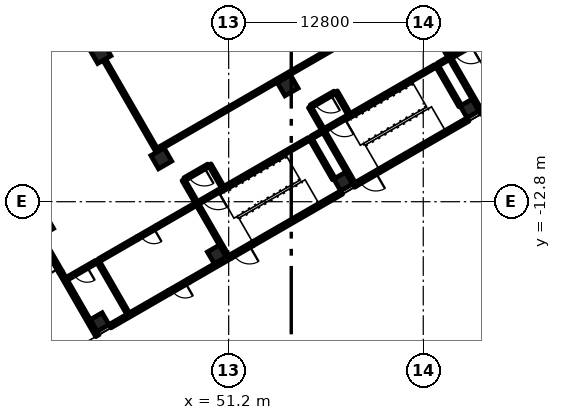
"""IFC4 building model, lengths in metres.
Left out: names, types, materials, properties, quantities, classifications, styles, units other than length and angle.
Written with IfcOpenShell. Run it as: python <this file> out.ifc"""

import sys

from ifc_helpers import new_model, si_unit, direction, frame, frame_2d, origin, origin_2d, place, context, subcontext, project, spatial, rectangle, extrude, element, fill, save


model = new_model("IFC4")
c1 = context("Model", 3, precision=1e-05, world=origin(), true_north=direction((0.0, 1.0)))
c2 = subcontext(c1, "Body", "Model", "MODEL_VIEW")
j1 = project(units=[si_unit("LENGTHUNIT", "METRE"), si_unit("PLANEANGLEUNIT", "RADIAN")], contexts=[c1])
p1 = place(None, origin())
s1 = spatial("IfcSite", under=j1, at=p1, CompositionType="ELEMENT")
p2 = place(p1, origin())
s2 = spatial("IfcBuilding", under=s1, at=p2, CompositionType="ELEMENT")
p3 = place(p2, origin())
s3 = spatial("IfcBuildingStorey", under=s2, at=p3, CompositionType="ELEMENT", Elevation=0.0)
for number, where, z_axis, x_axis in (
    (1, (42.71, -20.721, -0.3), (0.0, 0.0, 1.0), (-0.5, 0.866, 0.0)),
    (2, (50.418, -16.271, -0.3), (0.0, 0.0, 1.0), (-0.5, 0.866, 0.0)),
    (3, (58.732, -11.471, -0.3), (0.0, 0.0, 1.0), (-0.5, 0.866, 0.0)),
    (4, (67.046, -6.671, -0.3), (0.0, 0.0, 1.0), (-0.5, 0.866, 0.0)),
    (5, (39.061, -14.399, -0.3), (0.0, 0.0, 1.0), (-0.5, 0.866, 0.0)),
):
    element("IfcColumn", number, at=place(p3, frame(where, z_axis=z_axis, x_axis=x_axis)), inside=s3, PredefinedType="COLUMN", context=c2, shape_type="SweptSolid", body=[
        extrude(rectangle(XDim=0.9, YDim=0.9, at=origin_2d()), origin(), (0.0, 0.0, 1.0), 6.3),
    ])
for number, where, z_axis, x_axis in (
    (6, (46.768, -9.949, -0.3), (0.0, 0.0, 1.0), (-0.5, 0.866, 0.0)),
    (7, (55.082, -5.149, -0.3), (0.0, 0.0, 1.0), (-0.5, 0.866, 0.0)),
    (8, (42.768, -3.021, -0.3), (0.0, 0.0, 1.0), (-0.5, 0.866, 0.0)),
):
    element("IfcColumn", number, at=place(p3, frame(where, z_axis=z_axis, x_axis=x_axis)), inside=s3, PredefinedType="COLUMN", context=c2, shape_type="SweptSolid", body=[
        extrude(rectangle(XDim=1.0, YDim=1.0, at=origin_2d()), origin(), (0.0, 0.0, 1.0), 6.3),
    ])
p4 = place(p3, frame((42.562, -21.615, 0.0), z_axis=(0.0, 0.0, 1.0), x_axis=(-0.499972286653, 0.866041403502, 0.0)))
e9 = element("IfcWall", 9, at=p4, inside=s3, PredefinedType="SOLIDWALL", context=c2, shape_type="SweptSolid", body=[
    extrude(rectangle(XDim=4.85, YDim=0.25, at=frame_2d((2.425, 0.0))), origin(), (0.0, 0.0, 1.0), 5.7),
])
p5 = place(p3, frame((40.138, -17.414, 0.0), z_axis=(0.0, 0.0, 1.0), x_axis=(-0.500031774688, 0.866007057882, 0.0)))
e10 = element("IfcWall", 10, at=p5, inside=s3, PredefinedType="SOLIDWALL", context=c2, shape_type="SweptSolid", body=[
    extrude(rectangle(XDim=2.3, YDim=0.25, at=frame_2d((1.15, 0.0))), origin(), (0.0, 0.0, 1.0), 5.7),
])
p6 = place(p5, frame((0.25, 0.0, 0.0)))
e11 = element("IfcOpeningElement", 11, at=p6, cuts=e10, PredefinedType="OPENING", context=c2, shape_type="SweptSolid", body=[
    extrude(rectangle(XDim=1.8, YDim=2.1, at=frame_2d((0.9, 1.05))), frame((0.0, 0.135, 0.0), z_axis=(0.0, -1.0, 0.0), x_axis=(1.0, 0.0, 0.0)), (0.0, 0.0, 1.0), 0.27),
])
p7 = place(p3, frame((47.263, -18.756, 0.0), z_axis=(0.0, 0.0, 1.0), x_axis=(-0.866022053326, -0.50000580312, 0.0)))
e12 = element("IfcWall", 12, at=p7, inside=s3, PredefinedType="SOLIDWALL", context=c2, shape_type="SweptSolid", body=[
    extrude(rectangle(XDim=4.475, YDim=0.25, at=frame_2d((2.238, 0.0))), origin(), (0.0, 0.0, 1.0), 5.7),
])
p8 = place(p3, frame((48.562, -18.006, 0.0), z_axis=(0.0, 0.0, 1.0), x_axis=(-0.866031096941, -0.499990139034, 0.0)))
e13 = element("IfcWall", 13, at=p8, inside=s3, PredefinedType="SOLIDWALL", context=c2, shape_type="SweptSolid", body=[
    extrude(rectangle(XDim=1.5, YDim=0.25, at=frame_2d((0.75, 0.0))), origin(), (0.0, 0.0, 1.0), 5.7),
])
p9 = place(p8, frame((0.25, 0.0, 0.0)))
e14 = element("IfcOpeningElement", 14, at=p9, cuts=e13, PredefinedType="OPENING", context=c2, shape_type="SweptSolid", body=[
    extrude(rectangle(XDim=1.0, YDim=2.1, at=frame_2d((0.5, 1.05))), frame((0.0, 0.135, 0.0), z_axis=(0.0, -1.0, 0.0), x_axis=(1.0, 0.0, 0.0)), (0.0, 0.0, 1.0), 0.27),
])
p10 = place(p3, frame((51.312, -16.419, 0.0), z_axis=(0.0, 0.0, 1.0), x_axis=(-0.866048579423, -0.499959856469, 0.0)))
e15 = element("IfcWall", 15, at=p10, inside=s3, PredefinedType="SOLIDWALL", context=c2, shape_type="SweptSolid", body=[
    extrude(rectangle(XDim=3.175, YDim=0.25, at=frame_2d((1.587, 0.0))), origin(), (0.0, 0.0, 1.0), 5.7),
])
p11 = place(p3, frame((52.784, -15.569, 0.0), z_axis=(0.0, 0.0, 1.0), x_axis=(-0.865989465428, -0.500062241894, 0.0)))
e16 = element("IfcWall", 16, at=p11, inside=s3, PredefinedType="SOLIDWALL", context=c2, shape_type="SweptSolid", body=[
    extrude(rectangle(XDim=1.7, YDim=0.25, at=frame_2d((0.85, 0.0))), origin(), (0.0, 0.0, 1.0), 5.7),
])
p12 = place(p11, frame((0.25, 0.0, 0.0)))
e17 = element("IfcOpeningElement", 17, at=p12, cuts=e16, PredefinedType="OPENING", context=c2, shape_type="SweptSolid", body=[
    extrude(rectangle(XDim=1.2, YDim=2.1, at=frame_2d((0.6, 1.05))), frame((0.0, 0.135, 0.0), z_axis=(0.0, -1.0, 0.0), x_axis=(1.0, 0.0, 0.0)), (0.0, 0.0, 1.0), 0.27),
])
p13 = place(p3, frame((58.63, -12.194, 0.0), z_axis=(0.0, 0.0, 1.0), x_axis=(-0.866026575979, -0.499997969693, 0.0)))
e18 = element("IfcWall", 18, at=p13, inside=s3, PredefinedType="SOLIDWALL", context=c2, shape_type="SweptSolid", body=[
    extrude(rectangle(XDim=6.75, YDim=0.25, at=frame_2d((3.375, 0.0))), origin(), (0.0, 0.0, 1.0), 5.7),
])
p14 = place(p3, frame((61.098, -10.769, 0.0), z_axis=(0.0, 0.0, 1.0), x_axis=(-0.866058118026, -0.49994333299, 0.0)))
e19 = element("IfcWall", 19, at=p14, inside=s3, PredefinedType="SOLIDWALL", context=c2, shape_type="SweptSolid", body=[
    extrude(rectangle(XDim=1.85, YDim=0.25, at=frame_2d((0.925, 0.0))), origin(), (0.0, 0.0, 1.0), 5.7),
])
p15 = place(p14, frame((0.25, 0.0, 0.0)))
e20 = element("IfcOpeningElement", 20, at=p15, cuts=e19, PredefinedType="OPENING", context=c2, shape_type="SweptSolid", body=[
    extrude(rectangle(XDim=1.2, YDim=2.1, at=frame_2d((0.6, 1.05))), frame((0.0, 0.135, 0.0), z_axis=(0.0, -1.0, 0.0), x_axis=(1.0, 0.0, 0.0)), (0.0, 0.0, 1.0), 0.27),
])
p16 = place(p3, frame((66.944, -7.394, 0.0), z_axis=(0.0, 0.0, 1.0), x_axis=(-0.866026575979, -0.499997969693, 0.0)))
e21 = element("IfcWall", 21, at=p16, inside=s3, PredefinedType="SOLIDWALL", context=c2, shape_type="SweptSolid", body=[
    extrude(rectangle(XDim=6.75, YDim=0.25, at=frame_2d((3.375, 0.0))), origin(), (0.0, 0.0, 1.0), 5.7),
])
p17 = place(p3, frame((69.412, -5.969, 0.0), z_axis=(0.0, 0.0, 1.0), x_axis=(-0.866033964044, -0.499985172903, 0.0)))
e22 = element("IfcWall", 22, at=p17, inside=s3, PredefinedType="SOLIDWALL", context=c2, shape_type="SweptSolid", body=[
    extrude(rectangle(XDim=1.85, YDim=0.25, at=frame_2d((0.925, 0.0))), origin(), (0.0, 0.0, 1.0), 5.7),
])
p18 = place(p17, frame((0.25, 0.0, 0.0)))
e23 = element("IfcOpeningElement", 23, at=p18, cuts=e22, PredefinedType="OPENING", context=c2, shape_type="SweptSolid", body=[
    extrude(rectangle(XDim=1.2, YDim=2.1, at=frame_2d((0.6, 1.05))), frame((0.0, 0.135, 0.0), z_axis=(0.0, -1.0, 0.0), x_axis=(1.0, 0.0, 0.0)), (0.0, 0.0, 1.0), 0.27),
])
p19 = place(p3, frame((59.496, -11.694, 0.0), z_axis=(0.0, 0.0, 1.0), x_axis=(-0.865982457891, -0.500074377092, 0.0)))
e24 = element("IfcWall", 24, at=p19, inside=s3, PredefinedType="SOLIDWALL", context=c2, shape_type="SweptSolid", body=[
    extrude(rectangle(XDim=0.1, YDim=0.25, at=frame_2d((0.05, 0.0))), origin(), (0.0, 0.0, 1.0), 5.7),
])
p20 = place(p3, frame((67.81, -6.894, 0.0), z_axis=(0.0, 0.0, 1.0), x_axis=(-0.867038199201, -0.4982416694, 0.0)))
e25 = element("IfcWall", 25, at=p20, inside=s3, PredefinedType="SOLIDWALL", context=c2, shape_type="SweptSolid", body=[
    extrude(rectangle(XDim=0.1, YDim=0.25, at=frame_2d((0.05, 0.0))), origin(), (0.0, 0.0, 1.0), 5.7),
])
p21 = place(p3, frame((51.119, -16.385, 0.0), z_axis=(0.0, 0.0, 1.0), x_axis=(-0.49999894854, 0.866026010844, 0.0)))
e26 = element("IfcWall", 26, at=p21, inside=s3, PredefinedType="SOLIDWALL", context=c2, shape_type="SweptSolid", body=[
    extrude(rectangle(XDim=4.0, YDim=0.2, at=frame_2d((2.0, 0.0))), origin(), (0.0, 0.0, 1.0), 5.7),
])
p22 = place(p3, frame((58.117, -11.306, 0.0), z_axis=(0.0, 0.0, 1.0), x_axis=(-0.499933790963, 0.866063626216, 0.0)))
e27 = element("IfcWall", 27, at=p22, inside=s3, PredefinedType="SOLIDWALL", context=c2, shape_type="SweptSolid", body=[
    extrude(rectangle(XDim=3.1, YDim=0.2, at=frame_2d((1.55, 0.0))), origin(), (0.0, 0.0, 1.0), 5.7),
])
p23 = place(p3, frame((59.433, -11.585, 0.0), z_axis=(0.0, 0.0, 1.0), x_axis=(-0.49999894854, 0.866026010844, 0.0)))
e28 = element("IfcWall", 28, at=p23, inside=s3, PredefinedType="SOLIDWALL", context=c2, shape_type="SweptSolid", body=[
    extrude(rectangle(XDim=4.0, YDim=0.2, at=frame_2d((2.0, 0.0))), origin(), (0.0, 0.0, 1.0), 5.7),
])
p24 = place(p3, frame((66.431, -6.506, 0.0), z_axis=(0.0, 0.0, 1.0), x_axis=(-0.49999285859, 0.86602952684, 0.0)))
e29 = element("IfcWall", 29, at=p24, inside=s3, PredefinedType="SOLIDWALL", context=c2, shape_type="SweptSolid", body=[
    extrude(rectangle(XDim=3.1, YDim=0.2, at=frame_2d((1.55, 0.0))), origin(), (0.0, 0.0, 1.0), 5.7),
])
p25 = place(p3, frame((67.747, -6.785, 0.0), z_axis=(0.0, 0.0, 1.0), x_axis=(-0.49999894854, 0.866026010844, 0.0)))
e30 = element("IfcWall", 30, at=p25, inside=s3, PredefinedType="SOLIDWALL", context=c2, shape_type="SweptSolid", body=[
    extrude(rectangle(XDim=4.0, YDim=0.2, at=frame_2d((2.0, 0.0))), origin(), (0.0, 0.0, 1.0), 5.7),
])
p26 = place(p3, frame((50.722, -11.996, 0.0), z_axis=(0.0, 0.0, 1.0), x_axis=(-0.866036909293, -0.499980071345, 0.0)))
e31 = element("IfcWall", 31, at=p26, inside=s3, PredefinedType="SOLIDWALL", context=c2, shape_type="SweptSolid", body=[
    extrude(rectangle(XDim=1.75, YDim=0.2, at=frame_2d((0.875, 0.0))), origin(), (0.0, 0.0, 1.0), 5.7),
])
p27 = place(p26, frame((0.25, 0.0, 0.0)))
e32 = element("IfcOpeningElement", 32, at=p27, cuts=e31, PredefinedType="OPENING", context=c2, shape_type="SweptSolid", body=[
    extrude(rectangle(XDim=1.2, YDim=2.1, at=frame_2d((0.6, 1.05))), frame((0.0, 0.11, 0.0), z_axis=(0.0, -1.0, 0.0), x_axis=(1.0, 0.0, 0.0)), (0.0, 0.0, 1.0), 0.22),
])
p28 = place(p3, frame((50.722, -11.996, 0.0), z_axis=(0.0, 0.0, 1.0), x_axis=(0.866027239912, 0.49999681972, 0.0)))
e33 = element("IfcWall", 33, at=p28, inside=s3, PredefinedType="SOLIDWALL", context=c2, shape_type="SweptSolid", body=[
    extrude(rectangle(XDim=6.65, YDim=0.2, at=frame_2d((3.325, 0.0))), origin(), (0.0, 0.0, 1.0), 5.7),
])
p29 = place(p3, frame((59.035, -7.196, 0.0), z_axis=(0.0, 0.0, 1.0), x_axis=(-0.866002029911, -0.500040482552, 0.0)))
e34 = element("IfcWall", 34, at=p29, inside=s3, PredefinedType="SOLIDWALL", context=c2, shape_type="SweptSolid", body=[
    extrude(rectangle(XDim=1.75, YDim=0.2, at=frame_2d((0.875, 0.0))), origin(), (0.0, 0.0, 1.0), 5.7),
])
p30 = place(p29, frame((0.25, 0.0, 0.0)))
e35 = element("IfcOpeningElement", 35, at=p30, cuts=e34, PredefinedType="OPENING", context=c2, shape_type="SweptSolid", body=[
    extrude(rectangle(XDim=1.2, YDim=2.1, at=frame_2d((0.6, 1.05))), frame((0.0, 0.11, 0.0), z_axis=(0.0, -1.0, 0.0), x_axis=(1.0, 0.0, 0.0)), (0.0, 0.0, 1.0), 0.22),
])
p31 = place(p3, frame((59.035, -7.196, 0.0), z_axis=(0.0, 0.0, 1.0), x_axis=(0.866027239912, 0.49999681972, 0.0)))
e36 = element("IfcWall", 36, at=p31, inside=s3, PredefinedType="SOLIDWALL", context=c2, shape_type="SweptSolid", body=[
    extrude(rectangle(XDim=6.65, YDim=0.2, at=frame_2d((3.325, 0.0))), origin(), (0.0, 0.0, 1.0), 5.7),
])
p32 = place(p3, frame((67.349, -2.396, 0.0), z_axis=(0.0, 0.0, 1.0), x_axis=(-0.866036909293, -0.499980071345, 0.0)))
e37 = element("IfcWall", 37, at=p32, inside=s3, PredefinedType="SOLIDWALL", context=c2, shape_type="SweptSolid", body=[
    extrude(rectangle(XDim=1.75, YDim=0.2, at=frame_2d((0.875, 0.0))), origin(), (0.0, 0.0, 1.0), 5.7),
])
p33 = place(p32, frame((0.25, 0.0, 0.0)))
e38 = element("IfcOpeningElement", 38, at=p33, cuts=e37, PredefinedType="OPENING", context=c2, shape_type="SweptSolid", body=[
    extrude(rectangle(XDim=1.2, YDim=2.1, at=frame_2d((0.6, 1.05))), frame((0.0, 0.11, 0.0), z_axis=(0.0, -1.0, 0.0), x_axis=(1.0, 0.0, 0.0)), (0.0, 0.0, 1.0), 0.22),
])
for number, where, z_axis, x_axis in (
    (39, (49.07, -12.835, 0.0), (0.0, 0.0, 1.0), (-0.5, 0.866, 0.0)),
    (40, (50.802, -11.835, 0.0), (0.0, 0.0, 1.0), (-0.5, 0.866, 0.0)),
):
    element("IfcWall", number, at=place(p3, frame(where, z_axis=z_axis, x_axis=x_axis)), inside=s3, PredefinedType="PARTITIONING", context=c2, shape_type="SweptSolid", body=[
        extrude(rectangle(XDim=1.7, YDim=0.2, at=frame_2d((0.85, 0.0))), origin(), (0.0, 0.0, 1.0), 5.1),
    ])
for number, where, z_axis, x_axis in (
    (41, (57.383, -8.035, 0.0), (0.0, 0.0, 1.0), (-0.5, 0.866, 0.0)),
    (42, (59.115, -7.035, 0.0), (0.0, 0.0, 1.0), (-0.5, 0.866, 0.0)),
):
    element("IfcWall", number, at=place(p3, frame(where, z_axis=z_axis, x_axis=x_axis)), inside=s3, PredefinedType="PARTITIONING", context=c2, shape_type="SweptSolid", body=[
        extrude(rectangle(XDim=1.7, YDim=0.2, at=frame_2d((0.85, 0.0))), origin(), (0.0, 0.0, 1.0), 5.1),
    ])
p34 = place(p3, frame((65.697, -3.235, 0.0), z_axis=(0.0, 0.0, 1.0), x_axis=(-0.499892348375, 0.866087547558, 0.0)))
e43 = element("IfcWall", 43, at=p34, inside=s3, PredefinedType="PARTITIONING", context=c2, shape_type="SweptSolid", body=[
    extrude(rectangle(XDim=1.7, YDim=0.2, at=frame_2d((0.85, 0.0))), origin(), (0.0, 0.0, 1.0), 5.1),
])
p35 = place(p3, frame((49.865, -10.413, 0.0), z_axis=(0.0, 0.0, 1.0), x_axis=(-0.866047807691, -0.499961193289, 0.0)))
e44 = element("IfcWall", 44, at=p35, inside=s3, PredefinedType="PARTITIONING", context=c2, shape_type="SweptSolid", body=[
    extrude(rectangle(XDim=1.8, YDim=0.2, at=frame_2d((0.9, 0.0))), origin(), (0.0, 0.0, 1.0), 5.1),
])
p36 = place(p35, frame((0.3, 0.0, 0.0)))
e45 = element("IfcOpeningElement", 45, at=p36, cuts=e44, PredefinedType="OPENING", context=c2, shape_type="SweptSolid", body=[
    extrude(rectangle(XDim=1.2, YDim=2.1, at=frame_2d((0.6, 1.05))), frame((0.0, 0.11, 0.0), z_axis=(0.0, -1.0, 0.0), x_axis=(1.0, 0.0, 0.0)), (0.0, 0.0, 1.0), 0.22),
])
p37 = place(p3, frame((58.179, -5.613, 0.0), z_axis=(0.0, 0.0, 1.0), x_axis=(-0.866047807691, -0.499961193289, 0.0)))
e46 = element("IfcWall", 46, at=p37, inside=s3, PredefinedType="PARTITIONING", context=c2, shape_type="SweptSolid", body=[
    extrude(rectangle(XDim=1.8, YDim=0.2, at=frame_2d((0.9, 0.0))), origin(), (0.0, 0.0, 1.0), 5.1),
])
p38 = place(p37, frame((0.3, 0.0, 0.0)))
e47 = element("IfcOpeningElement", 47, at=p38, cuts=e46, PredefinedType="OPENING", context=c2, shape_type="SweptSolid", body=[
    extrude(rectangle(XDim=1.2, YDim=2.1, at=frame_2d((0.6, 1.05))), frame((0.0, 0.11, 0.0), z_axis=(0.0, -1.0, 0.0), x_axis=(1.0, 0.0, 0.0)), (0.0, 0.0, 1.0), 0.22),
])
p39 = place(p3, frame((44.581, -20.16, 0.0), z_axis=(0.0, 0.0, 1.0), x_axis=(-0.49999894854, 0.866026010844, 0.0)))
e48 = element("IfcWall", 48, at=p39, inside=s3, PredefinedType="PARTITIONING", context=c2, shape_type="SweptSolid", body=[
    extrude(rectangle(XDim=4.0, YDim=0.2, at=frame_2d((2.0, 0.0))), origin(), (0.0, 0.0, 1.0), 5.1),
])
p40 = place(p3, frame((42.667, -16.646, 0.0), z_axis=(0.0, 0.0, 1.0), x_axis=(0.86601045545, 0.500025890382, 0.0)))
e49 = element("IfcWall", 49, at=p40, inside=s3, PredefinedType="PARTITIONING", context=c2, shape_type="SweptSolid", body=[
    extrude(rectangle(XDim=2.925, YDim=0.2, at=frame_2d((1.462, 0.0))), origin(), (0.0, 0.0, 1.0), 5.1),
])
p41 = place(p3, frame((46.5, -14.434, 0.0), z_axis=(0.0, 0.0, 1.0), x_axis=(-0.866031096941, -0.499990139034, 0.0)))
e50 = element("IfcWall", 50, at=p41, inside=s3, PredefinedType="PARTITIONING", context=c2, shape_type="SweptSolid", body=[
    extrude(rectangle(XDim=1.5, YDim=0.2, at=frame_2d((0.75, 0.0))), origin(), (0.0, 0.0, 1.0), 5.1),
])
p42 = place(p41, frame((0.25, 0.0, 0.0)))
e51 = element("IfcOpeningElement", 51, at=p42, cuts=e50, PredefinedType="OPENING", context=c2, shape_type="SweptSolid", body=[
    extrude(rectangle(XDim=1.0, YDim=2.1, at=frame_2d((0.5, 1.05))), frame((0.0, 0.11, 0.0), z_axis=(0.0, -1.0, 0.0), x_axis=(1.0, 0.0, 0.0)), (0.0, 0.0, 1.0), 0.22),
])
p43 = place(p3, frame((46.5, -14.434, 0.0), z_axis=(0.0, 0.0, 1.0), x_axis=(0.866046596414, 0.499963291492, 0.0)))
e52 = element("IfcWall", 52, at=p43, inside=s3, PredefinedType="PARTITIONING", context=c2, shape_type="SweptSolid", body=[
    extrude(rectangle(XDim=2.925, YDim=0.2, at=frame_2d((1.462, 0.0))), origin(), (0.0, 0.0, 1.0), 5.1),
])
p44 = place(p3, frame((42.494, -16.746, 0.0), z_axis=(0.0, 0.0, 1.0), x_axis=(-0.866017533419, -0.500013631625, 0.0)))
e53 = element("IfcWall", 53, at=p44, inside=s3, PredefinedType="PARTITIONING", context=c2, shape_type="SweptSolid", body=[
    extrude(rectangle(XDim=2.25, YDim=0.2, at=frame_2d((1.125, 0.0))), origin(), (0.0, 0.0, 1.0), 5.1),
])
p45 = place(p44, frame((0.7, 0.0, 0.0)))
e54 = element("IfcOpeningElement", 54, at=p45, cuts=e53, PredefinedType="OPENING", context=c2, shape_type="SweptSolid", body=[
    extrude(rectangle(XDim=1.0, YDim=2.1, at=frame_2d((0.5, 1.05))), frame((0.0, 0.11, 0.0), z_axis=(0.0, -1.0, 0.0), x_axis=(1.0, 0.0, 0.0)), (0.0, 0.0, 1.0), 0.22),
])
p46 = place(p3, frame((46.456, -9.407, 0.0), z_axis=(0.0, 0.0, 1.0), x_axis=(-0.500004234368, 0.866022959057, 0.0)))
e55 = element("IfcWall", 55, at=p46, inside=s3, PredefinedType="PARTITIONING", context=c2, shape_type="SweptSolid", body=[
    extrude(rectangle(XDim=6.875, YDim=0.2, at=frame_2d((3.438, 0.0))), origin(), (0.0, 0.0, 1.0), 5.1),
])
p47 = place(p3, frame((46.542, -9.357, 0.0), z_axis=(0.0, 0.0, 1.0), x_axis=(0.866023601547, 0.500003121554, 0.0)))
e56 = element("IfcWall", 56, at=p47, inside=s3, PredefinedType="PARTITIONING", context=c2, shape_type="SweptSolid", body=[
    extrude(rectangle(XDim=19.0, YDim=0.2, at=frame_2d((9.5, 0.0))), origin(), (0.0, 0.0, 1.0), 5.1),
])
p48 = place(p3, frame((56.654, -8.571, 0.0), z_axis=(0.0, 0.0, 1.0), x_axis=(0.866094119867, 0.499880961361, 0.0)))
e57 = element("IfcWall", 57, at=p48, inside=s3, PredefinedType="PARTITIONING", context=c2, shape_type="SweptSolid", body=[
    extrude(rectangle(XDim=0.8, YDim=0.2, at=frame_2d((0.4, 0.0))), origin(), (0.0, 0.0, 1.0), 5.1),
])
p49 = place(p3, frame((64.968, -3.771, 0.0), z_axis=(0.0, 0.0, 1.0), x_axis=(0.865885638426, 0.500242002602, 0.0)))
e58 = element("IfcWall", 58, at=p49, inside=s3, PredefinedType="PARTITIONING", context=c2, shape_type="SweptSolid", body=[
    extrude(rectangle(XDim=0.8, YDim=0.2, at=frame_2d((0.4, 0.0))), origin(), (0.0, 0.0, 1.0), 5.1),
])
p50 = place(p6, origin())
e59 = element("IfcDoor", 59, at=p50, inside=s3, OperationType="DOUBLE_DOOR_SINGLE_SWING", PredefinedType="DOOR", context=c2, shape_type="SweptSolid", body=[
    extrude(rectangle(XDim=1.8, YDim=2.1, at=frame_2d((0.9, 1.05))), frame((0.0, 0.025, 0.0), z_axis=(0.0, -1.0, 0.0), x_axis=(1.0, 0.0, 0.0)), (0.0, 0.0, 1.0), 0.05),
])
fill(e11, e59)
p51 = place(p9, origin())
e60 = element("IfcDoor", 60, at=p51, inside=s3, OperationType="SINGLE_SWING_LEFT", PredefinedType="DOOR", context=c2, shape_type="SweptSolid", body=[
    extrude(rectangle(XDim=1.0, YDim=2.1, at=frame_2d((0.5, 1.05))), frame((0.0, 0.025, 0.0), z_axis=(0.0, -1.0, 0.0), x_axis=(1.0, 0.0, 0.0)), (0.0, 0.0, 1.0), 0.05),
])
fill(e14, e60)
p52 = place(p12, origin())
e61 = element("IfcDoor", 61, at=p52, inside=s3, OperationType="SINGLE_SWING_LEFT", PredefinedType="DOOR", context=c2, shape_type="SweptSolid", body=[
    extrude(rectangle(XDim=1.2, YDim=2.1, at=frame_2d((0.6, 1.05))), frame((0.0, 0.025, 0.0), z_axis=(0.0, -1.0, 0.0), x_axis=(1.0, 0.0, 0.0)), (0.0, 0.0, 1.0), 0.05),
])
fill(e17, e61)
p53 = place(p15, origin())
e62 = element("IfcDoor", 62, at=p53, inside=s3, OperationType="SINGLE_SWING_LEFT", PredefinedType="DOOR", context=c2, shape_type="SweptSolid", body=[
    extrude(rectangle(XDim=1.2, YDim=2.1, at=frame_2d((0.6, 1.05))), frame((0.0, 0.025, 0.0), z_axis=(0.0, -1.0, 0.0), x_axis=(1.0, 0.0, 0.0)), (0.0, 0.0, 1.0), 0.05),
])
fill(e20, e62)
p54 = place(p27, origin())
e63 = element("IfcDoor", 63, at=p54, inside=s3, OperationType="SINGLE_SWING_LEFT", PredefinedType="DOOR", context=c2, shape_type="SweptSolid", body=[
    extrude(rectangle(XDim=1.2, YDim=2.1, at=frame_2d((0.6, 1.05))), frame((0.0, 0.025, 0.0), z_axis=(0.0, -1.0, 0.0), x_axis=(1.0, 0.0, 0.0)), (0.0, 0.0, 1.0), 0.05),
])
fill(e32, e63)
p55 = place(p30, origin())
e64 = element("IfcDoor", 64, at=p55, inside=s3, OperationType="SINGLE_SWING_LEFT", PredefinedType="DOOR", context=c2, shape_type="SweptSolid", body=[
    extrude(rectangle(XDim=1.2, YDim=2.1, at=frame_2d((0.6, 1.05))), frame((0.0, 0.025, 0.0), z_axis=(0.0, -1.0, 0.0), x_axis=(1.0, 0.0, 0.0)), (0.0, 0.0, 1.0), 0.05),
])
fill(e35, e64)
p56 = place(p33, origin())
e65 = element("IfcDoor", 65, at=p56, inside=s3, OperationType="SINGLE_SWING_LEFT", PredefinedType="DOOR", context=c2, shape_type="SweptSolid", body=[
    extrude(rectangle(XDim=1.2, YDim=2.1, at=frame_2d((0.6, 1.05))), frame((0.0, 0.025, 0.0), z_axis=(0.0, -1.0, 0.0), x_axis=(1.0, 0.0, 0.0)), (0.0, 0.0, 1.0), 0.05),
])
fill(e38, e65)
p57 = place(p36, origin())
e66 = element("IfcDoor", 66, at=p57, inside=s3, OperationType="SINGLE_SWING_LEFT", PredefinedType="DOOR", context=c2, shape_type="SweptSolid", body=[
    extrude(rectangle(XDim=1.2, YDim=2.1, at=frame_2d((0.6, 1.05))), frame((0.0, 0.025, 0.0), z_axis=(0.0, -1.0, 0.0), x_axis=(1.0, 0.0, 0.0)), (0.0, 0.0, 1.0), 0.05),
])
fill(e45, e66)
p58 = place(p38, origin())
e67 = element("IfcDoor", 67, at=p58, inside=s3, OperationType="SINGLE_SWING_LEFT", PredefinedType="DOOR", context=c2, shape_type="SweptSolid", body=[
    extrude(rectangle(XDim=1.2, YDim=2.1, at=frame_2d((0.6, 1.05))), frame((0.0, 0.025, 0.0), z_axis=(0.0, -1.0, 0.0), x_axis=(1.0, 0.0, 0.0)), (0.0, 0.0, 1.0), 0.05),
])
fill(e47, e67)
p59 = place(p42, origin())
e68 = element("IfcDoor", 68, at=p59, inside=s3, OperationType="SINGLE_SWING_LEFT", PredefinedType="DOOR", context=c2, shape_type="SweptSolid", body=[
    extrude(rectangle(XDim=1.0, YDim=2.1, at=frame_2d((0.5, 1.05))), frame((0.0, 0.025, 0.0), z_axis=(0.0, -1.0, 0.0), x_axis=(1.0, 0.0, 0.0)), (0.0, 0.0, 1.0), 0.05),
])
fill(e51, e68)
p60 = place(p45, origin())
e69 = element("IfcDoor", 69, at=p60, inside=s3, OperationType="SINGLE_SWING_LEFT", PredefinedType="DOOR", context=c2, shape_type="SweptSolid", body=[
    extrude(rectangle(XDim=1.0, YDim=2.1, at=frame_2d((0.5, 1.05))), frame((0.0, 0.025, 0.0), z_axis=(0.0, -1.0, 0.0), x_axis=(1.0, 0.0, 0.0)), (0.0, 0.0, 1.0), 0.05),
])
fill(e54, e69)
save(model, sys.argv[1])
